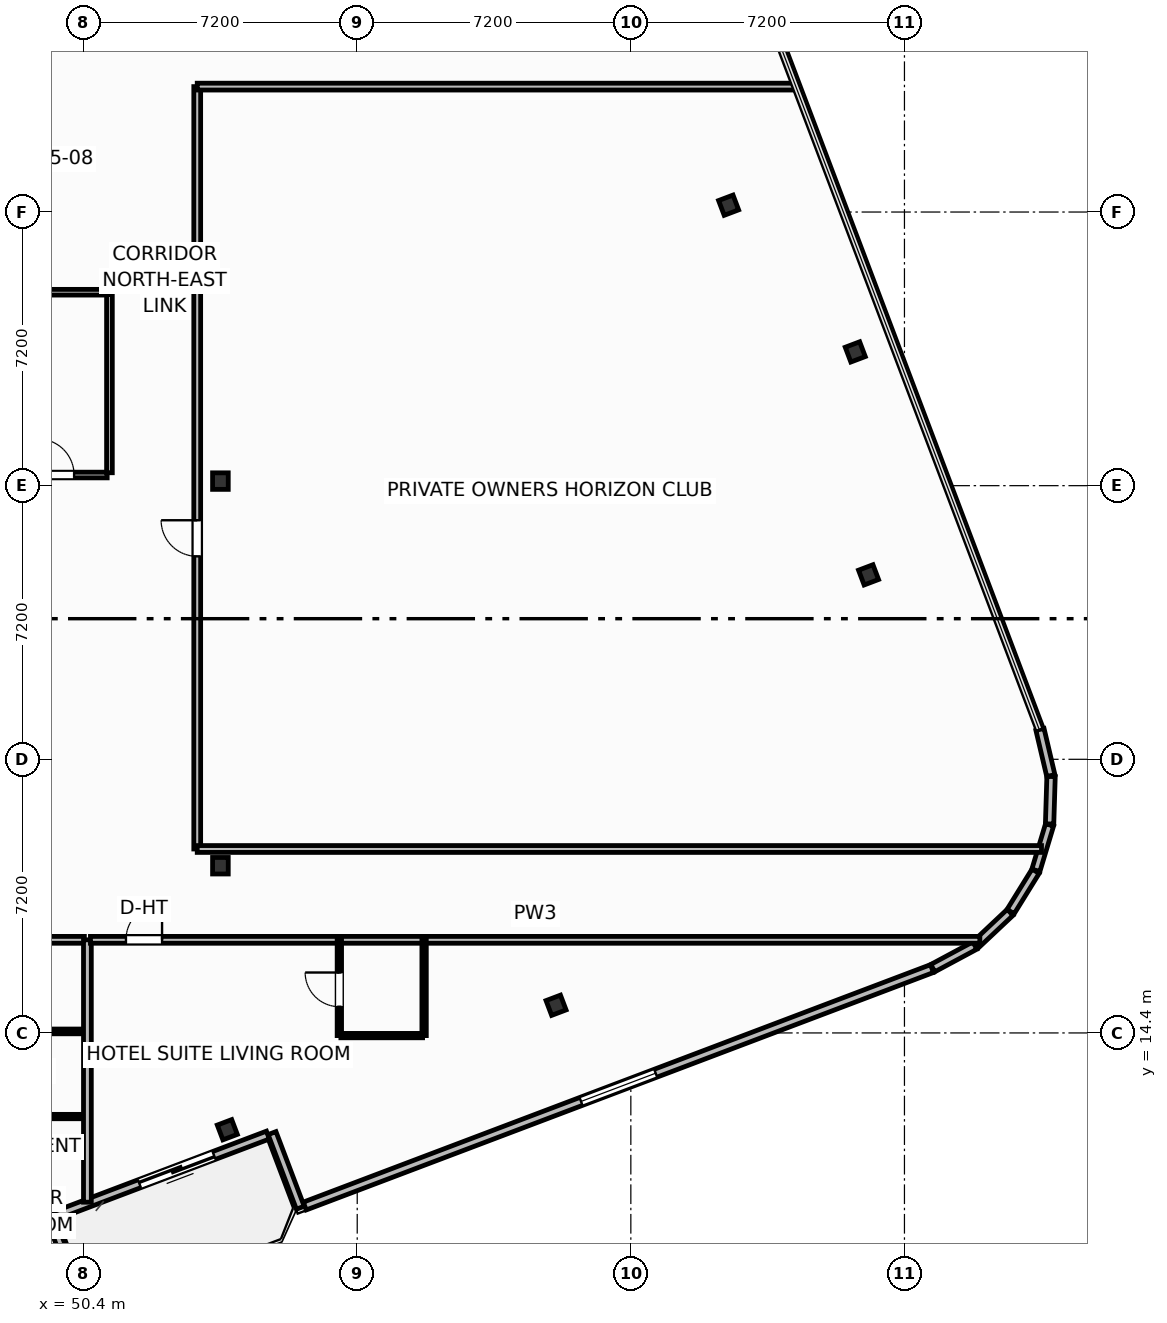
"""IFC4 building model, lengths in metres.
Left out: names, types, materials, properties, quantities, classifications, styles, units other than length and angle.
Written with IfcOpenShell. Run it as: python <this file> out.ifc"""

import sys

from ifc_helpers import new_model, si_unit, direction, frame, frame_2d, origin, origin_2d, place, context, subcontext, project, spatial, rectangle, i_section, extrude, element, fill, save


model = new_model("IFC4")
c1 = context("Model", 3, precision=1e-05, world=origin(), true_north=direction((0.0, 1.0)))
c2 = subcontext(c1, "Body", "Model", "MODEL_VIEW")
j1 = project(units=[si_unit("LENGTHUNIT", "METRE"), si_unit("PLANEANGLEUNIT", "RADIAN")], contexts=[c1])
p1 = place(None, origin())
s1 = spatial("IfcSite", under=j1, at=p1, CompositionType="ELEMENT")
p2 = place(p1, origin())
s2 = spatial("IfcBuilding", under=s1, at=p2, CompositionType="ELEMENT")
p3 = place(p2, frame((0.0, 0.0, 216.4)))
s3 = spatial("IfcBuildingStorey", under=s2, at=p3, CompositionType="ELEMENT", Elevation=216.4)
for number, where, z_axis, x_axis in (
    (1, (54.0, 18.8, 0.0), (0.0, 0.0, 1.0), (1.0, 0.0, 0.0)),
    (2, (54.0, 28.92, 0.0), (0.0, 0.0, 1.0), (1.0, 0.0, 0.0)),
):
    element("IfcColumn", number, at=place(p3, frame(where, z_axis=z_axis, x_axis=x_axis)), inside=s3, PredefinedType="COLUMN", context=c2, shape_type="SweptSolid", body=[
        extrude(i_section(OverallWidth=0.412, OverallDepth=0.435, WebThickness=0.036, FlangeThickness=0.057, FilletRadius=0.025, at=origin_2d()), origin(), (0.0, 0.0, 1.0), 3.7),
    ])
for number, where, z_axis, x_axis in (
    (3, (54.181, 11.853, 0.0), (0.0, 0.0, 1.0), (0.935, 0.354, 0.0)),
    (4, (62.832, 15.128, 0.0), (0.0, 0.0, 1.0), (0.935, 0.354, 0.0)),
    (5, (71.055, 26.453, 0.0), (0.0, 0.0, 1.0), (0.935, 0.354, 0.0)),
    (6, (70.706, 32.32, 0.0), (0.0, 0.0, 1.0), (0.935, 0.354, 0.0)),
    (7, (67.373, 36.18, 0.0), (0.0, 0.0, 1.0), (0.935, 0.354, 0.0)),
):
    element("IfcColumn", number, at=place(p3, frame(where, z_axis=z_axis, x_axis=x_axis)), inside=s3, PredefinedType="COLUMN", context=c2, shape_type="SweptSolid", body=[
        extrude(i_section(OverallWidth=0.406, OverallDepth=0.416, WebThickness=0.03, FlangeThickness=0.048, FilletRadius=0.025, at=origin_2d()), origin(), (0.0, 0.0, 1.0), 3.7),
    ])
p4 = place(p3, frame((55.25, 11.713, 0.0), z_axis=(0.0, 0.0, 1.0), x_axis=(-0.935227640088, -0.354046976001, 0.0)))
e8 = element("IfcWall", 8, at=p4, inside=s3, PredefinedType="SOLIDWALL", context=c2, shape_type="SweptSolid", body=[
    extrude(rectangle(XDim=6.0, YDim=0.22, at=frame_2d((3.0, 0.0))), origin(), (0.0, 0.0, 1.0), 2.73),
])
p5 = place(p4, frame((1.516, 0.0, 0.0)))
e9 = element("IfcOpeningElement", 9, at=p5, cuts=e8, PredefinedType="OPENING", context=c2, shape_type="SweptSolid", body=[
    extrude(rectangle(XDim=2.1, YDim=2.3, at=frame_2d((1.05, 1.15))), frame((0.0, 0.12, 0.0), z_axis=(0.0, -1.0, 0.0), x_axis=(1.0, 0.0, 0.0)), (0.0, 0.0, 1.0), 0.24),
])
p6 = place(p3, frame((50.223, 7.708, 0.0), z_axis=(0.0, 0.0, 1.0), x_axis=(-0.354020680661, 0.935237594232, 0.0)))
e10 = element("IfcWall", 10, at=p6, inside=s3, PredefinedType="SOLIDWALL", context=c2, shape_type="SweptSolid", body=[
    extrude(rectangle(XDim=1.975, YDim=0.22, at=frame_2d((0.988, 0.0))), origin(), (0.0, 0.0, 1.0), 2.73),
])
p7 = place(p3, frame((55.359, 11.764, 0.0), z_axis=(0.0, 0.0, 1.0), x_axis=(0.354026782794, -0.935235284334, 0.0)))
e11 = element("IfcWall", 11, at=p7, inside=s3, PredefinedType="SOLIDWALL", context=c2, shape_type="SweptSolid", body=[
    extrude(rectangle(XDim=2.1, YDim=0.22, at=frame_2d((1.05, 0.0))), origin(), (0.0, 0.0, 1.0), 2.73),
])
p8 = place(p3, frame((56.219, 9.845, 0.0), z_axis=(0.0, 0.0, 1.0), x_axis=(0.935225601791, 0.354052360188, 0.0)))
e12 = element("IfcWall", 12, at=p8, inside=s3, PredefinedType="SOLIDWALL", context=c2, shape_type="SweptSolid", body=[
    extrude(rectangle(XDim=17.647, YDim=0.22, at=frame_2d((8.824, 0.0))), origin(), (0.0, 0.0, 1.0), 2.73),
])
p9 = place(p8, frame((7.774, 0.0, 0.8)))
e13 = element("IfcOpeningElement", 13, at=p9, cuts=e12, PredefinedType="OPENING", context=c2, shape_type="SweptSolid", body=[
    extrude(rectangle(XDim=2.1, YDim=1.75, at=frame_2d((1.05, 0.875))), frame((0.0, 0.12, 0.0), z_axis=(0.0, -1.0, 0.0), x_axis=(1.0, 0.0, 0.0)), (0.0, 0.0, 1.0), 0.24),
])
p10 = place(p3, frame((72.746, 16.105, 0.0), z_axis=(0.0, 0.0, 1.0), x_axis=(0.881112879796, 0.472906008693, 0.0)))
e14 = element("IfcWall", 14, at=p10, inside=s3, PredefinedType="SOLIDWALL", context=c2, shape_type="SweptSolid", body=[
    extrude(rectangle(XDim=1.257, YDim=0.22, at=frame_2d((0.628, 0.0))), origin(), (0.0, 0.0, 1.0), 2.73),
])
p11 = place(p3, frame((73.871, 16.717, 0.0), z_axis=(0.0, 0.0, 1.0), x_axis=(0.728475443486, 0.685071914647, 0.0)))
e15 = element("IfcWall", 15, at=p11, inside=s3, PredefinedType="SOLIDWALL", context=c2, shape_type="SweptSolid", body=[
    extrude(rectangle(XDim=1.249, YDim=0.22, at=frame_2d((0.625, 0.0))), origin(), (0.0, 0.0, 1.0), 2.73),
])
for number, where, z_axis, x_axis in (
    (16, (74.794, 17.593, 0.0), (0.0, 0.0, 1.0), (0.527, 0.85, 0.0)),
    (17, (75.458, 18.679, 0.0), (0.0, 0.0, 1.0), (0.288, 0.958, 0.0)),
):
    element("IfcWall", number, at=place(p3, frame(where, z_axis=z_axis, x_axis=x_axis)), inside=s3, PredefinedType="SOLIDWALL", context=c2, shape_type="SweptSolid", body=[
        extrude(rectangle(XDim=1.249, YDim=0.22, at=frame_2d((0.624, 0.0))), origin(), (0.0, 0.0, 1.0), 2.73),
    ])
p12 = place(p3, frame((75.819, 19.899, 0.0), z_axis=(0.0, 0.0, 1.0), x_axis=(0.030898954628, 0.999522513305, 0.0)))
e18 = element("IfcWall", 18, at=p12, inside=s3, PredefinedType="SOLIDWALL", context=c2, shape_type="SweptSolid", body=[
    extrude(rectangle(XDim=1.248, YDim=0.22, at=frame_2d((0.624, 0.0))), origin(), (0.0, 0.0, 1.0), 2.73),
])
p13 = place(p3, frame((75.852, 21.172, 0.0), z_axis=(0.0, 0.0, 1.0), x_axis=(-0.228941257463, 0.973440239887, 0.0)))
e19 = element("IfcWall", 19, at=p13, inside=s3, PredefinedType="SOLIDWALL", context=c2, shape_type="SweptSolid", body=[
    extrude(rectangle(XDim=1.249, YDim=0.22, at=frame_2d((0.625, 0.0))), origin(), (0.0, 0.0, 1.0), 2.73),
])
p14 = place(p3, frame((40.58, 16.85, 0.0), z_axis=(0.0, 0.0, 1.0), x_axis=(1.0, 0.0, 0.0)))
e20 = element("IfcWall", 20, at=p14, inside=s3, PredefinedType="PARTITIONING", context=c2, shape_type="SweptSolid", body=[
    extrude(rectangle(XDim=9.84, YDim=0.18, at=frame_2d((4.92, 0.0))), origin(), (0.0, 0.0, 1.0), 3.45),
])
p15 = place(p14, frame((2.302, 0.0, 0.0)))
e21 = element("IfcOpeningElement", 21, at=p15, cuts=e20, PredefinedType="OPENING", context=c2, shape_type="SweptSolid", body=[
    extrude(rectangle(XDim=1.0, YDim=2.2, at=frame_2d((0.5, 1.1))), frame((0.0, 0.1, 0.0), z_axis=(0.0, -1.0, 0.0), x_axis=(1.0, 0.0, 0.0)), (0.0, 0.0, 1.0), 0.2),
])
p16 = place(p3, frame((46.325, 14.44, 0.0), z_axis=(0.0, 0.0, 1.0), x_axis=(1.0, 0.0, 0.0)))
e22 = element("IfcWall", 22, at=p16, inside=s3, PredefinedType="PARTITIONING", context=c2, shape_type="SweptSolid", body=[
    extrude(rectangle(XDim=4.095, YDim=0.125, at=frame_2d((2.047, 0.0))), origin(), (0.0, 0.0, 1.0), 3.45),
])
p17 = place(p3, frame((46.325, 12.2, 0.0), z_axis=(0.0, 0.0, 1.0), x_axis=(1.0, 0.0, 0.0)))
e23 = element("IfcWall", 23, at=p17, inside=s3, PredefinedType="PARTITIONING", context=c2, shape_type="SweptSolid", body=[
    extrude(rectangle(XDim=4.095, YDim=0.115, at=frame_2d((2.047, 0.0))), origin(), (0.0, 0.0, 1.0), 3.45),
])
p18 = place(p3, frame((50.5, 9.946, 0.0), z_axis=(0.0, 0.0, 1.0), x_axis=(0.0, 1.0, 0.0)))
e24 = element("IfcWall", 24, at=p18, inside=s3, PredefinedType="PARTITIONING", context=c2, shape_type="SweptSolid", body=[
    extrude(rectangle(XDim=6.904, YDim=0.205, at=frame_2d((3.452, 0.0))), origin(), (0.0, 0.0, 1.0), 3.45),
])
p19 = place(p3, frame((50.58, 16.85, 0.0), z_axis=(0.0, 0.0, 1.0), x_axis=(1.0, 0.0, 0.0)))
e25 = element("IfcWall", 25, at=p19, inside=s3, PredefinedType="PARTITIONING", context=c2, shape_type="SweptSolid", body=[
    extrude(rectangle(XDim=23.404, YDim=0.18, at=frame_2d((11.702, 0.0))), origin(), (0.0, 0.0, 1.0), 3.45),
])
p20 = place(p19, frame((0.935, 0.0, 0.0)))
e26 = element("IfcOpeningElement", 26, at=p20, cuts=e25, PredefinedType="OPENING", context=c2, shape_type="SweptSolid", body=[
    extrude(rectangle(XDim=0.95, YDim=2.15, at=frame_2d((0.475, 1.075))), frame((0.0, 0.1, 0.0), z_axis=(0.0, -1.0, 0.0), x_axis=(1.0, 0.0, 0.0)), (0.0, 0.0, 1.0), 0.2),
])
p21 = place(p3, frame((57.17, 14.33, 0.0), z_axis=(0.0, 0.0, 1.0), x_axis=(1.0, 0.0, 0.0)))
e27 = element("IfcWall", 27, at=p21, inside=s3, PredefinedType="PARTITIONING", context=c2, shape_type="SweptSolid", body=[
    extrude(rectangle(XDim=2.15, YDim=0.115, at=frame_2d((1.075, 0.0))), origin(), (0.0, 0.0, 1.0), 3.45),
])
p22 = place(p3, frame((57.13, 14.33, 0.0), z_axis=(0.0, 0.0, 1.0), x_axis=(0.0, 1.0, 0.0)))
e28 = element("IfcWall", 28, at=p22, inside=s3, PredefinedType="PARTITIONING", context=c2, shape_type="SweptSolid", body=[
    extrude(rectangle(XDim=2.52, YDim=0.115, at=frame_2d((1.26, 0.0))), origin(), (0.0, 0.0, 1.0), 3.45),
])
p23 = place(p22, frame((0.76, 0.0, 0.0)))
e29 = element("IfcOpeningElement", 29, at=p23, cuts=e28, PredefinedType="OPENING", context=c2, shape_type="SweptSolid", body=[
    extrude(rectangle(XDim=0.9, YDim=2.05, at=frame_2d((0.45, 1.025))), frame((0.0, 0.067, 0.0), z_axis=(0.0, -1.0, 0.0), x_axis=(1.0, 0.0, 0.0)), (0.0, 0.0, 1.0), 0.135),
])
p24 = place(p3, frame((59.36, 14.33, 0.0), z_axis=(0.0, 0.0, 1.0), x_axis=(0.0, 1.0, 0.0)))
e30 = element("IfcWall", 30, at=p24, inside=s3, PredefinedType="PARTITIONING", context=c2, shape_type="SweptSolid", body=[
    extrude(rectangle(XDim=2.52, YDim=0.115, at=frame_2d((1.26, 0.0))), origin(), (0.0, 0.0, 1.0), 3.45),
])
p25 = place(p3, frame((53.39, 19.24, 0.0), z_axis=(0.0, 0.0, 1.0), x_axis=(0.0, 1.0, 0.0)))
e31 = element("IfcWall", 31, at=p25, inside=s3, PredefinedType="PARTITIONING", context=c2, shape_type="SweptSolid", body=[
    extrude(rectangle(XDim=20.06, YDim=0.18, at=frame_2d((10.03, 0.0))), origin(), (0.0, 0.0, 1.0), 3.45),
])
p26 = place(p25, frame((7.7, 0.0, 0.0)))
e32 = element("IfcOpeningElement", 32, at=p26, cuts=e31, PredefinedType="OPENING", context=c2, shape_type="SweptSolid", body=[
    extrude(rectangle(XDim=0.95, YDim=2.05, at=frame_2d((0.475, 1.025))), frame((0.0, 0.1, 0.0), z_axis=(0.0, -1.0, 0.0), x_axis=(1.0, 0.0, 0.0)), (0.0, 0.0, 1.0), 0.2),
])
p27 = place(p3, frame((53.39, 19.24, 0.0), z_axis=(0.0, 0.0, 1.0), x_axis=(1.0, 0.0, 0.0)))
e33 = element("IfcWall", 33, at=p27, inside=s3, PredefinedType="PARTITIONING", context=c2, shape_type="SweptSolid", body=[
    extrude(rectangle(XDim=22.217, YDim=0.18, at=frame_2d((11.108, 0.0))), origin(), (0.0, 0.0, 1.0), 3.45),
])
p28 = place(p3, frame((53.39, 39.3, 0.0), z_axis=(0.0, 0.0, 1.0), x_axis=(1.0, 0.0, 0.0)))
e34 = element("IfcWall", 34, at=p28, inside=s3, PredefinedType="PARTITIONING", context=c2, shape_type="SweptSolid", body=[
    extrude(rectangle(XDim=15.713, YDim=0.18, at=frame_2d((7.856, 0.0))), origin(), (0.0, 0.0, 1.0), 3.45),
])
p29 = place(p3, frame((48.3, 29.08, 0.0), z_axis=(0.0, 0.0, 1.0), x_axis=(1.0, 0.0, 0.0)))
e35 = element("IfcWall", 35, at=p29, inside=s3, PredefinedType="PARTITIONING", context=c2, shape_type="SweptSolid", body=[
    extrude(rectangle(XDim=2.72, YDim=0.15, at=frame_2d((1.36, 0.0))), origin(), (0.0, 0.0, 1.0), 2.662),
])
p30 = place(p29, frame((0.9, 0.0, 0.0)))
e36 = element("IfcOpeningElement", 36, at=p30, cuts=e35, PredefinedType="OPENING", context=c2, shape_type="SweptSolid", body=[
    extrude(rectangle(XDim=0.95, YDim=2.05, at=frame_2d((0.475, 1.025))), frame((0.0, 0.085, 0.0), z_axis=(0.0, -1.0, 0.0), x_axis=(1.0, 0.0, 0.0)), (0.0, 0.0, 1.0), 0.17),
])
p31 = place(p3, frame((48.3, 33.89, 0.0), z_axis=(0.0, 0.0, 1.0), x_axis=(1.0, 0.0, 0.0)))
e37 = element("IfcWall", 37, at=p31, inside=s3, PredefinedType="PARTITIONING", context=c2, shape_type="SweptSolid", body=[
    extrude(rectangle(XDim=2.72, YDim=0.15, at=frame_2d((1.36, 0.0))), origin(), (0.0, 0.0, 1.0), 3.45),
])
p32 = place(p3, frame((51.08, 29.14, 0.0), z_axis=(0.0, 0.0, 1.0), x_axis=(0.0, 1.0, 0.0)))
e38 = element("IfcWall", 38, at=p32, inside=s3, PredefinedType="PARTITIONING", context=c2, shape_type="SweptSolid", body=[
    extrude(rectangle(XDim=4.69, YDim=0.15, at=frame_2d((2.345, 0.0))), origin(), (0.0, 0.0, 1.0), 3.45),
])
p33 = place(p5, origin())
e39 = element("IfcDoor", 39, at=p33, inside=s3, OperationType="SLIDING_TO_LEFT", PredefinedType="DOOR", context=c2, shape_type="SweptSolid", body=[
    extrude(rectangle(XDim=2.1, YDim=2.3, at=frame_2d((1.05, 1.15))), frame((0.0, 0.025, 0.0), z_axis=(0.0, -1.0, 0.0), x_axis=(1.0, 0.0, 0.0)), (0.0, 0.0, 1.0), 0.05),
])
fill(e9, e39)
p34 = place(p9, origin())
e40 = element("IfcWindow", 40, at=p34, inside=s3, PartitioningType="SINGLE_PANEL", PredefinedType="WINDOW", context=c2, shape_type="SweptSolid", body=[
    extrude(rectangle(XDim=2.1, YDim=1.75, at=frame_2d((1.05, 0.875))), frame((0.0, 0.03, 0.0), z_axis=(0.0, -1.0, 0.0), x_axis=(1.0, 0.0, 0.0)), (0.0, 0.0, 1.0), 0.06),
])
fill(e13, e40)
p35 = place(p20, origin())
e41 = element("IfcDoor", 41, at=p35, inside=s3, OperationType="SINGLE_SWING_RIGHT", PredefinedType="DOOR", context=c2, shape_type="SweptSolid", body=[
    extrude(rectangle(XDim=0.95, YDim=2.15, at=frame_2d((0.475, 1.075))), frame((0.0, 0.025, 0.0), z_axis=(0.0, -1.0, 0.0), x_axis=(1.0, 0.0, 0.0)), (0.0, 0.0, 1.0), 0.05),
])
fill(e26, e41)
p36 = place(p23, origin())
e42 = element("IfcDoor", 42, at=p36, inside=s3, OperationType="SINGLE_SWING_RIGHT", PredefinedType="DOOR", context=c2, shape_type="SweptSolid", body=[
    extrude(rectangle(XDim=0.9, YDim=2.05, at=frame_2d((0.45, 1.025))), frame((0.0, 0.025, 0.0), z_axis=(0.0, -1.0, 0.0), x_axis=(1.0, 0.0, 0.0)), (0.0, 0.0, 1.0), 0.05),
])
fill(e29, e42)
p37 = place(p26, origin())
e43 = element("IfcDoor", 43, at=p37, inside=s3, OperationType="SINGLE_SWING_RIGHT", PredefinedType="DOOR", context=c2, shape_type="SweptSolid", body=[
    extrude(rectangle(XDim=0.95, YDim=2.05, at=frame_2d((0.475, 1.025))), frame((0.0, 0.025, 0.0), z_axis=(0.0, -1.0, 0.0), x_axis=(1.0, 0.0, 0.0)), (0.0, 0.0, 1.0), 0.05),
])
fill(e32, e43)
p38 = place(p30, origin())
e44 = element("IfcDoor", 44, at=p38, inside=s3, OperationType="SINGLE_SWING_LEFT", PredefinedType="DOOR", context=c2, shape_type="SweptSolid", body=[
    extrude(rectangle(XDim=0.95, YDim=2.05, at=frame_2d((0.475, 1.025))), frame((0.0, 0.025, 0.0), z_axis=(0.0, -1.0, 0.0), x_axis=(1.0, 0.0, 0.0)), (0.0, 0.0, 1.0), 0.05),
])
fill(e36, e44)
save(model, sys.argv[1])
